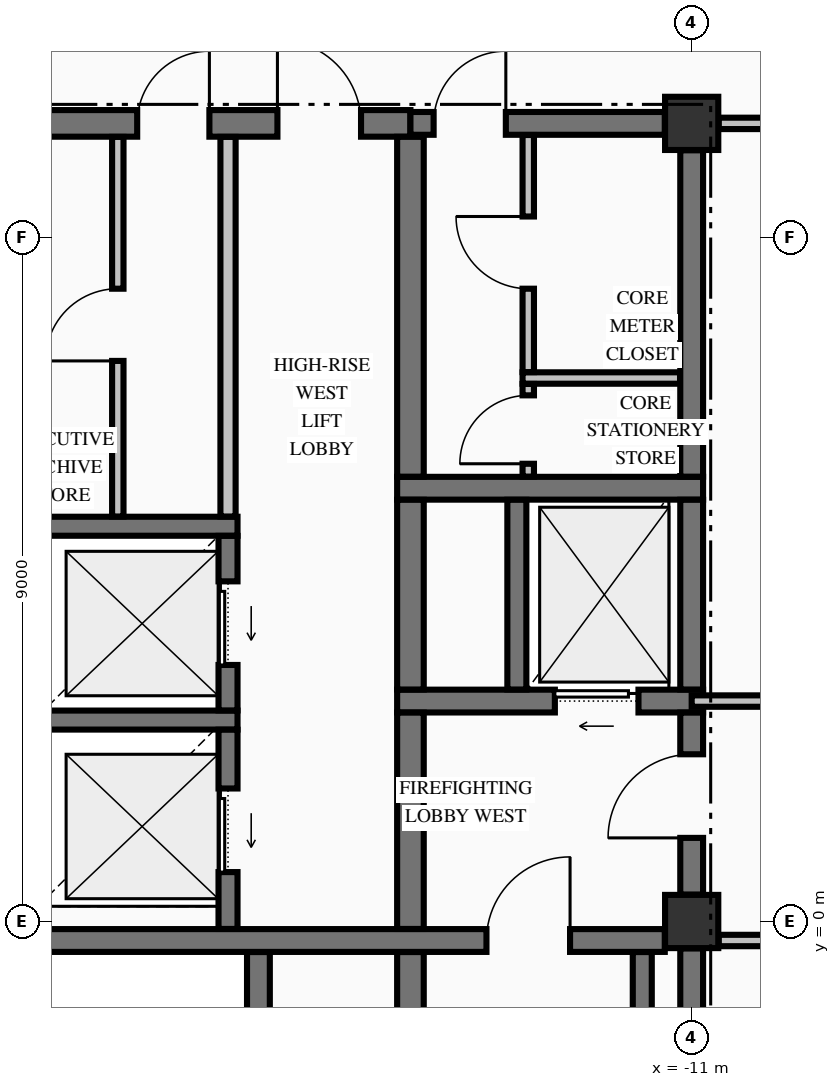
"""IFC4 building model, lengths in metres.
Left out: names, types, materials, properties, quantities, classifications, styles, units other than length and angle.
Written with IfcOpenShell. Run it as: python <this file> out.ifc"""

import sys

from ifc_helpers import new_model, si_unit, direction, frame, frame_2d, origin, origin_2d, place, context, subcontext, project, spatial, rectangle, extrude, element, fill, save


model = new_model("IFC4")
c1 = context("Model", 3, precision=1e-05, world=origin(), true_north=direction((0.0, 1.0)))
c2 = subcontext(c1, "Body", "Model", "MODEL_VIEW")
j1 = project(units=[si_unit("LENGTHUNIT", "METRE"), si_unit("PLANEANGLEUNIT", "RADIAN")], contexts=[c1])
p1 = place(None, origin())
s1 = spatial("IfcSite", under=j1, at=p1, CompositionType="ELEMENT")
p2 = place(p1, origin())
s2 = spatial("IfcBuilding", under=s1, at=p2, CompositionType="ELEMENT")
p3 = place(p2, frame((0.0, 0.0, 246.2)))
s3 = spatial("IfcBuildingStorey", under=s2, at=p3, CompositionType="ELEMENT", Elevation=246.2)
for number, where, z_axis, x_axis in (
    (1, (-11.0, 0.0, -0.25), (0.0, 0.0, 1.0), (1.0, 0.0, 0.0)),
    (2, (-11.0, 10.5, -0.25), (0.0, 0.0, 1.0), (1.0, 0.0, 0.0)),
):
    element("IfcColumn", number, at=place(p3, frame(where, z_axis=z_axis, x_axis=x_axis)), inside=s3, PredefinedType="COLUMN", context=c2, shape_type="SweptSolid", body=[
        extrude(rectangle(XDim=0.7, YDim=0.7, at=origin_2d()), origin(), (0.0, 0.0, 1.0), 3.055),
    ])
p4 = place(p3, frame((-20.571, -0.25, 0.0), z_axis=(0.0, 0.0, 1.0), x_axis=(1.0, 0.0, 0.0)))
e3 = element("IfcWall", 3, at=p4, inside=s3, PredefinedType="SHEAR", context=c2, shape_type="SweptSolid", body=[
    extrude(rectangle(XDim=9.217, YDim=0.3, at=frame_2d((4.608, 0.0))), origin(), (0.0, 0.0, 1.0), 2.805),
])
p5 = place(p4, frame((6.871, 0.0, 0.0)))
e4 = element("IfcOpeningElement", 4, at=p5, cuts=e3, PredefinedType="OPENING", context=c2, shape_type="SweptSolid", body=[
    extrude(rectangle(XDim=1.1, YDim=2.15, at=frame_2d((0.55, 1.075))), frame((0.0, 0.16, 0.0), z_axis=(0.0, -1.0, 0.0), x_axis=(1.0, 0.0, 0.0)), (0.0, 0.0, 1.0), 0.32),
])
p6 = place(p3, frame((-20.175, 2.65, 0.0), z_axis=(0.0, 0.0, 1.0), x_axis=(1.0, 0.0, 0.0)))
e5 = element("IfcWall", 5, at=p6, inside=s3, PredefinedType="SOLIDWALL", context=c2, shape_type="SweptSolid", body=[
    extrude(rectangle(XDim=3.2, YDim=0.25, at=frame_2d((1.6, 0.0))), origin(), (0.0, 0.0, 1.0), 2.805),
])
p7 = place(p3, frame((-14.875, 2.9, 0.0), z_axis=(0.0, 0.0, 1.0), x_axis=(1.0, 0.0, 0.0)))
e6 = element("IfcWall", 6, at=p7, inside=s3, PredefinedType="SHEAR", context=c2, shape_type="SweptSolid", body=[
    extrude(rectangle(XDim=4.025, YDim=0.3, at=frame_2d((2.012, 0.0))), origin(), (0.0, 0.0, 1.0), 2.805),
])
p8 = place(p7, frame((2.075, 0.0, 0.0)))
e7 = element("IfcOpeningElement", 7, at=p8, cuts=e6, PredefinedType="OPENING", context=c2, shape_type="SweptSolid", body=[
    extrude(rectangle(XDim=1.1, YDim=2.2, at=frame_2d((0.55, 1.1))), frame((0.0, 0.16, 0.0), z_axis=(0.0, -1.0, 0.0), x_axis=(1.0, 0.0, 0.0)), (0.0, 0.0, 1.0), 0.32),
])
p9 = place(p3, frame((-20.175, 5.2, 0.0), z_axis=(0.0, 0.0, 1.0), x_axis=(1.0, 0.0, 0.0)))
e8 = element("IfcWall", 8, at=p9, inside=s3, PredefinedType="SOLIDWALL", context=c2, shape_type="SweptSolid", body=[
    extrude(rectangle(XDim=3.2, YDim=0.25, at=frame_2d((1.6, 0.0))), origin(), (0.0, 0.0, 1.0), 2.805),
])
p10 = place(p3, frame((-14.875, 5.7, 0.0), z_axis=(0.0, 0.0, 1.0), x_axis=(1.0, 0.0, 0.0)))
e9 = element("IfcWall", 9, at=p10, inside=s3, PredefinedType="SHEAR", context=c2, shape_type="SweptSolid", body=[
    extrude(rectangle(XDim=4.025, YDim=0.3, at=frame_2d((2.012, 0.0))), origin(), (0.0, 0.0, 1.0), 2.805),
])
p11 = place(p3, frame((-19.646, 10.5, 0.0), z_axis=(0.0, 0.0, 1.0), x_axis=(1.0, 0.0, 0.0)))
e10 = element("IfcWall", 10, at=p11, inside=s3, PredefinedType="SHEAR", context=c2, shape_type="SweptSolid", body=[
    extrude(rectangle(XDim=4.946, YDim=0.35, at=frame_2d((2.473, 0.0))), origin(), (0.0, 0.0, 1.0), 2.805),
])
p12 = place(p11, frame((3.196, 0.0, 0.0)))
e11 = element("IfcOpeningElement", 11, at=p12, cuts=e10, PredefinedType="OPENING", context=c2, shape_type="SweptSolid", body=[
    extrude(rectangle(XDim=1.1, YDim=2.15, at=frame_2d((0.55, 1.075))), frame((0.0, 0.185, 0.0), z_axis=(0.0, -1.0, 0.0), x_axis=(1.0, 0.0, 0.0)), (0.0, 0.0, 1.0), 0.37),
])
p13 = place(p11, frame((1.351, 0.0, 0.0)))
e12 = element("IfcOpeningElement", 12, at=p13, cuts=e10, PredefinedType="OPENING", context=c2, shape_type="SweptSolid", body=[
    extrude(rectangle(XDim=0.95, YDim=2.15, at=frame_2d((0.475, 1.075))), frame((0.0, 0.185, 0.0), z_axis=(0.0, -1.0, 0.0), x_axis=(1.0, 0.0, 0.0)), (0.0, 0.0, 1.0), 0.37),
])
p14 = place(p3, frame((-14.7, 10.5, 0.0), z_axis=(0.0, 0.0, 1.0), x_axis=(1.0, 0.0, 0.0)))
e13 = element("IfcWall", 13, at=p14, inside=s3, PredefinedType="SHEAR", context=c2, shape_type="SweptSolid", body=[
    extrude(rectangle(XDim=3.346, YDim=0.3, at=frame_2d((1.673, 0.0))), origin(), (0.0, 0.0, 1.0), 2.805),
])
p15 = place(p14, frame((0.305, 0.0, 0.0)))
e14 = element("IfcOpeningElement", 14, at=p15, cuts=e13, PredefinedType="OPENING", context=c2, shape_type="SweptSolid", body=[
    extrude(rectangle(XDim=0.95, YDim=2.15, at=frame_2d((0.475, 1.075))), frame((0.0, 0.16, 0.0), z_axis=(0.0, -1.0, 0.0), x_axis=(1.0, 0.0, 0.0)), (0.0, 0.0, 1.0), 0.32),
])
p16 = place(p3, frame((-10.644, -0.25, 0.0), z_axis=(0.0, 0.0, 1.0), x_axis=(1.0, 0.0, 0.0)))
e15 = element("IfcWall", 15, at=p16, inside=s3, PredefinedType="PARTITIONING", context=c2, shape_type="SweptSolid", body=[
    extrude(rectangle(XDim=21.288, YDim=0.15, at=frame_2d((10.644, 0.0))), origin(), (0.0, 0.0, 1.0), 2.805),
])
p17 = place(p16, frame((7.344, 0.0, 0.0)))
e16 = element("IfcOpeningElement", 16, at=p17, cuts=e15, PredefinedType="OPENING", context=c2, shape_type="SweptSolid", body=[
    extrude(rectangle(XDim=1.1, YDim=2.15, at=frame_2d((0.55, 1.075))), frame((0.0, 0.085, 0.0), z_axis=(0.0, -1.0, 0.0), x_axis=(1.0, 0.0, 0.0)), (0.0, 0.0, 1.0), 0.17),
])
p18 = place(p16, frame((2.699, 0.0, 0.0)))
e17 = element("IfcOpeningElement", 17, at=p18, cuts=e15, PredefinedType="OPENING", context=c2, shape_type="SweptSolid", body=[
    extrude(rectangle(XDim=1.05, YDim=2.15, at=frame_2d((0.525, 1.075))), frame((0.0, 0.085, 0.0), z_axis=(0.0, -1.0, 0.0), x_axis=(1.0, 0.0, 0.0)), (0.0, 0.0, 1.0), 0.17),
])
p19 = place(p16, frame((14.839, 0.0, 0.0)))
e18 = element("IfcOpeningElement", 18, at=p19, cuts=e15, PredefinedType="OPENING", context=c2, shape_type="SweptSolid", body=[
    extrude(rectangle(XDim=0.95, YDim=2.15, at=frame_2d((0.475, 1.075))), frame((0.0, 0.085, 0.0), z_axis=(0.0, -1.0, 0.0), x_axis=(1.0, 0.0, 0.0)), (0.0, 0.0, 1.0), 0.17),
])
p20 = place(p3, frame((-11.0, 2.9, 0.0), z_axis=(0.0, 0.0, 1.0), x_axis=(1.0, 0.0, 0.0)))
e19 = element("IfcWall", 19, at=p20, inside=s3, PredefinedType="PARTITIONING", context=c2, shape_type="SweptSolid", body=[
    extrude(rectangle(XDim=22.0, YDim=0.15, at=frame_2d((11.0, 0.0))), origin(), (0.0, 0.0, 1.0), 2.805),
])
p21 = place(p20, frame((7.7, 0.0, 0.0)))
e20 = element("IfcOpeningElement", 20, at=p21, cuts=e19, PredefinedType="OPENING", context=c2, shape_type="SweptSolid", body=[
    extrude(rectangle(XDim=1.1, YDim=2.15, at=frame_2d((0.55, 1.075))), frame((0.0, 0.085, 0.0), z_axis=(0.0, -1.0, 0.0), x_axis=(1.0, 0.0, 0.0)), (0.0, 0.0, 1.0), 0.17),
])
p22 = place(p20, frame((3.055, 0.0, 0.0)))
e21 = element("IfcOpeningElement", 21, at=p22, cuts=e19, PredefinedType="OPENING", context=c2, shape_type="SweptSolid", body=[
    extrude(rectangle(XDim=1.05, YDim=2.15, at=frame_2d((0.525, 1.075))), frame((0.0, 0.085, 0.0), z_axis=(0.0, -1.0, 0.0), x_axis=(1.0, 0.0, 0.0)), (0.0, 0.0, 1.0), 0.17),
])
p23 = place(p20, frame((11.475, 0.0, 0.0)))
e22 = element("IfcOpeningElement", 22, at=p23, cuts=e19, PredefinedType="OPENING", context=c2, shape_type="SweptSolid", body=[
    extrude(rectangle(XDim=0.95, YDim=2.15, at=frame_2d((0.475, 1.075))), frame((0.0, 0.085, 0.0), z_axis=(0.0, -1.0, 0.0), x_axis=(1.0, 0.0, 0.0)), (0.0, 0.0, 1.0), 0.17),
])
p24 = place(p20, frame((17.795, 0.0, 0.0)))
e23 = element("IfcOpeningElement", 23, at=p24, cuts=e19, PredefinedType="OPENING", context=c2, shape_type="SweptSolid", body=[
    extrude(rectangle(XDim=0.95, YDim=2.15, at=frame_2d((0.475, 1.075))), frame((0.0, 0.085, 0.0), z_axis=(0.0, -1.0, 0.0), x_axis=(1.0, 0.0, 0.0)), (0.0, 0.0, 1.0), 0.17),
])
p25 = place(p3, frame((-13.225, 7.15, 0.0), z_axis=(0.0, 0.0, 1.0), x_axis=(1.0, 0.0, 0.0)))
e24 = element("IfcWall", 24, at=p25, inside=s3, PredefinedType="PARTITIONING", context=c2, shape_type="SweptSolid", body=[
    extrude(rectangle(XDim=2.072, YDim=0.15, at=frame_2d((1.036, 0.0))), origin(), (0.0, 0.0, 1.0), 2.805),
])
p26 = place(p3, frame((-10.644, 10.5, 0.0), z_axis=(0.0, 0.0, 1.0), x_axis=(1.0, 0.0, 0.0)))
e25 = element("IfcWall", 25, at=p26, inside=s3, PredefinedType="PARTITIONING", context=c2, shape_type="SweptSolid", body=[
    extrude(rectangle(XDim=21.288, YDim=0.15, at=frame_2d((10.644, 0.0))), origin(), (0.0, 0.0, 1.0), 2.805),
])
p27 = place(p26, frame((7.344, 0.0, 0.0)))
e26 = element("IfcOpeningElement", 26, at=p27, cuts=e25, PredefinedType="OPENING", context=c2, shape_type="SweptSolid", body=[
    extrude(rectangle(XDim=1.1, YDim=2.15, at=frame_2d((0.55, 1.075))), frame((0.0, 0.085, 0.0), z_axis=(0.0, -1.0, 0.0), x_axis=(1.0, 0.0, 0.0)), (0.0, 0.0, 1.0), 0.17),
])
p28 = place(p3, frame((-17.1, -0.098, 0.0), z_axis=(0.0, 0.0, 1.0), x_axis=(0.0, 1.0, 0.0)))
e27 = element("IfcWall", 27, at=p28, inside=s3, PredefinedType="SOLIDWALL", context=c2, shape_type="SweptSolid", body=[
    extrude(rectangle(XDim=2.621, YDim=0.25, at=frame_2d((1.311, 0.0))), origin(), (0.0, 0.0, 1.0), 2.805),
])
p29 = place(p28, frame((0.748, 0.0, 0.0)))
e28 = element("IfcOpeningElement", 28, at=p29, cuts=e27, PredefinedType="OPENING", context=c2, shape_type="SweptSolid", body=[
    extrude(rectangle(XDim=1.1, YDim=2.2, at=frame_2d((0.55, 1.1))), frame((0.0, 0.135, 0.0), z_axis=(0.0, -1.0, 0.0), x_axis=(1.0, 0.0, 0.0)), (0.0, 0.0, 1.0), 0.27),
])
p30 = place(p3, frame((-17.1, 2.777, 0.0), z_axis=(0.0, 0.0, 1.0), x_axis=(0.0, 1.0, 0.0)))
e29 = element("IfcWall", 29, at=p30, inside=s3, PredefinedType="SOLIDWALL", context=c2, shape_type="SweptSolid", body=[
    extrude(rectangle(XDim=2.296, YDim=0.25, at=frame_2d((1.148, 0.0))), origin(), (0.0, 0.0, 1.0), 2.805),
])
p31 = place(p30, frame((0.598, 0.0, 0.0)))
e30 = element("IfcOpeningElement", 30, at=p31, cuts=e29, PredefinedType="OPENING", context=c2, shape_type="SweptSolid", body=[
    extrude(rectangle(XDim=1.1, YDim=2.2, at=frame_2d((0.55, 1.1))), frame((0.0, 0.135, 0.0), z_axis=(0.0, -1.0, 0.0), x_axis=(1.0, 0.0, 0.0)), (0.0, 0.0, 1.0), 0.27),
])
p32 = place(p3, frame((-16.7, -9.773, 0.0), z_axis=(0.0, 0.0, 1.0), x_axis=(0.0, 1.0, 0.0)))
e31 = element("IfcWall", 31, at=p32, inside=s3, PredefinedType="SHEAR", context=c2, shape_type="SweptSolid", body=[
    extrude(rectangle(XDim=9.371, YDim=0.3, at=frame_2d((4.686, 0.0))), origin(), (0.0, 0.0, 1.0), 2.805),
])
p33 = place(p3, frame((-14.7, -9.773, 0.0), z_axis=(0.0, 0.0, 1.0), x_axis=(0.0, 1.0, 0.0)))
e32 = element("IfcWall", 32, at=p33, inside=s3, PredefinedType="SHEAR", context=c2, shape_type="SweptSolid", body=[
    extrude(rectangle(XDim=9.371, YDim=0.35, at=frame_2d((4.686, 0.0))), origin(), (0.0, 0.0, 1.0), 2.805),
])
p34 = place(p3, frame((-14.7, -0.098, 0.0), z_axis=(0.0, 0.0, 1.0), x_axis=(0.0, 1.0, 0.0)))
e33 = element("IfcWall", 33, at=p34, inside=s3, PredefinedType="SHEAR", context=c2, shape_type="SweptSolid", body=[
    extrude(rectangle(XDim=2.846, YDim=0.35, at=frame_2d((1.423, 0.0))), origin(), (0.0, 0.0, 1.0), 2.805),
])
p35 = place(p3, frame((-14.7, 3.052, 0.0), z_axis=(0.0, 0.0, 1.0), x_axis=(0.0, 1.0, 0.0)))
e34 = element("IfcWall", 34, at=p35, inside=s3, PredefinedType="SHEAR", context=c2, shape_type="SweptSolid", body=[
    extrude(rectangle(XDim=2.496, YDim=0.35, at=frame_2d((1.248, 0.0))), origin(), (0.0, 0.0, 1.0), 2.805),
])
p36 = place(p3, frame((-14.7, 5.852, 0.0), z_axis=(0.0, 0.0, 1.0), x_axis=(0.0, 1.0, 0.0)))
e35 = element("IfcWall", 35, at=p36, inside=s3, PredefinedType="SHEAR", context=c2, shape_type="SweptSolid", body=[
    extrude(rectangle(XDim=4.471, YDim=0.35, at=frame_2d((2.235, 0.0))), origin(), (0.0, 0.0, 1.0), 2.805),
])
p37 = place(p3, frame((-13.3, 3.052, 0.0), z_axis=(0.0, 0.0, 1.0), x_axis=(0.0, 1.0, 0.0)))
e36 = element("IfcWall", 36, at=p37, inside=s3, PredefinedType="SOLIDWALL", context=c2, shape_type="SweptSolid", body=[
    extrude(rectangle(XDim=2.496, YDim=0.25, at=frame_2d((1.248, 0.0))), origin(), (0.0, 0.0, 1.0), 2.805),
])
p38 = place(p3, frame((-11.65, -9.798, 0.0), z_axis=(0.0, 0.0, 1.0), x_axis=(0.0, 1.0, 0.0)))
e37 = element("IfcWall", 37, at=p38, inside=s3, PredefinedType="SOLIDWALL", context=c2, shape_type="SweptSolid", body=[
    extrude(rectangle(XDim=9.396, YDim=0.25, at=frame_2d((4.698, 0.0))), origin(), (0.0, 0.0, 1.0), 2.805),
])
p39 = place(p3, frame((-11.0, -9.596, 0.0), z_axis=(0.0, 0.0, 1.0), x_axis=(0.0, 1.0, 0.0)))
e38 = element("IfcWall", 38, at=p39, inside=s3, PredefinedType="SHEAR", context=c2, shape_type="SweptSolid", body=[
    extrude(rectangle(XDim=9.242, YDim=0.3, at=frame_2d((4.621, 0.0))), origin(), (0.0, 0.0, 1.0), 2.805),
])
p40 = place(p3, frame((-11.0, 0.354, 0.0), z_axis=(0.0, 0.0, 1.0), x_axis=(0.0, 1.0, 0.0)))
e39 = element("IfcWall", 39, at=p40, inside=s3, PredefinedType="SHEAR", context=c2, shape_type="SweptSolid", body=[
    extrude(rectangle(XDim=2.394, YDim=0.3, at=frame_2d((1.197, 0.0))), origin(), (0.0, 0.0, 1.0), 2.805),
])
p41 = place(p40, frame((0.746, 0.0, 0.0)))
e40 = element("IfcOpeningElement", 40, at=p41, cuts=e39, PredefinedType="OPENING", context=c2, shape_type="SweptSolid", body=[
    extrude(rectangle(XDim=1.1, YDim=2.15, at=frame_2d((0.55, 1.075))), frame((0.0, 0.16, 0.0), z_axis=(0.0, -1.0, 0.0), x_axis=(1.0, 0.0, 0.0)), (0.0, 0.0, 1.0), 0.32),
])
p42 = place(p3, frame((-11.0, 3.052, 0.0), z_axis=(0.0, 0.0, 1.0), x_axis=(0.0, 1.0, 0.0)))
e41 = element("IfcWall", 41, at=p42, inside=s3, PredefinedType="SHEAR", context=c2, shape_type="SweptSolid", body=[
    extrude(rectangle(XDim=2.496, YDim=0.3, at=frame_2d((1.248, 0.0))), origin(), (0.0, 0.0, 1.0), 2.805),
])
p43 = place(p3, frame((-11.0, 5.852, 0.0), z_axis=(0.0, 0.0, 1.0), x_axis=(0.0, 1.0, 0.0)))
e42 = element("IfcWall", 42, at=p43, inside=s3, PredefinedType="SHEAR", context=c2, shape_type="SweptSolid", body=[
    extrude(rectangle(XDim=4.294, YDim=0.3, at=frame_2d((2.147, 0.0))), origin(), (0.0, 0.0, 1.0), 2.805),
])
p44 = place(p3, frame((-18.55, 5.328, 0.0), z_axis=(0.0, 0.0, 1.0), x_axis=(0.0, 1.0, 0.0)))
e43 = element("IfcWall", 43, at=p44, inside=s3, PredefinedType="PARTITIONING", context=c2, shape_type="SweptSolid", body=[
    extrude(rectangle(XDim=4.994, YDim=0.15, at=frame_2d((2.497, 0.0))), origin(), (0.0, 0.0, 1.0), 2.805),
])
p45 = place(p44, frame((2.047, 0.0, 0.0)))
e44 = element("IfcOpeningElement", 44, at=p45, cuts=e43, PredefinedType="OPENING", context=c2, shape_type="SweptSolid", body=[
    extrude(rectangle(XDim=0.95, YDim=2.15, at=frame_2d((0.475, 1.075))), frame((0.0, 0.085, 0.0), z_axis=(0.0, -1.0, 0.0), x_axis=(1.0, 0.0, 0.0)), (0.0, 0.0, 1.0), 0.17),
])
p46 = place(p3, frame((-17.1, 5.328, 0.0), z_axis=(0.0, 0.0, 1.0), x_axis=(0.0, 1.0, 0.0)))
e45 = element("IfcWall", 45, at=p46, inside=s3, PredefinedType="PARTITIONING", context=c2, shape_type="SweptSolid", body=[
    extrude(rectangle(XDim=4.994, YDim=0.2, at=frame_2d((2.497, 0.0))), origin(), (0.0, 0.0, 1.0), 2.805),
])
p47 = place(p3, frame((-13.15, 5.853, 0.0), z_axis=(0.0, 0.0, 1.0), x_axis=(0.0, 1.0, 0.0)))
e46 = element("IfcWall", 46, at=p47, inside=s3, PredefinedType="PARTITIONING", context=c2, shape_type="SweptSolid", body=[
    extrude(rectangle(XDim=1.219, YDim=0.15, at=frame_2d((0.609, 0.0))), origin(), (0.0, 0.0, 1.0), 2.805),
])
p48 = place(p47, frame((0.169, 0.0, 0.0)))
e47 = element("IfcOpeningElement", 47, at=p48, cuts=e46, PredefinedType="OPENING", context=c2, shape_type="SweptSolid", body=[
    extrude(rectangle(XDim=0.9, YDim=2.15, at=frame_2d((0.45, 1.075))), frame((0.0, 0.085, 0.0), z_axis=(0.0, -1.0, 0.0), x_axis=(1.0, 0.0, 0.0)), (0.0, 0.0, 1.0), 0.17),
])
p49 = place(p3, frame((-13.15, 7.228, 0.0), z_axis=(0.0, 0.0, 1.0), x_axis=(0.0, 1.0, 0.0)))
e48 = element("IfcWall", 48, at=p49, inside=s3, PredefinedType="PARTITIONING", context=c2, shape_type="SweptSolid", body=[
    extrude(rectangle(XDim=3.119, YDim=0.15, at=frame_2d((1.56, 0.0))), origin(), (0.0, 0.0, 1.0), 2.805),
])
p50 = place(p49, frame((1.097, 0.0, 0.0)))
e49 = element("IfcOpeningElement", 49, at=p50, cuts=e48, PredefinedType="OPENING", context=c2, shape_type="SweptSolid", body=[
    extrude(rectangle(XDim=0.95, YDim=2.15, at=frame_2d((0.475, 1.075))), frame((0.0, 0.085, 0.0), z_axis=(0.0, -1.0, 0.0), x_axis=(1.0, 0.0, 0.0)), (0.0, 0.0, 1.0), 0.17),
])
p51 = place(p5, origin())
e50 = element("IfcDoor", 50, at=p51, inside=s3, OperationType="SINGLE_SWING_RIGHT", PredefinedType="DOOR", context=c2, shape_type="SweptSolid", body=[
    extrude(rectangle(XDim=1.1, YDim=2.15, at=frame_2d((0.55, 1.075))), frame((0.0, 0.025, 0.0), z_axis=(0.0, -1.0, 0.0), x_axis=(1.0, 0.0, 0.0)), (0.0, 0.0, 1.0), 0.05),
])
fill(e4, e50)
p52 = place(p41, origin())
e51 = element("IfcDoor", 51, at=p52, inside=s3, OperationType="SINGLE_SWING_LEFT", PredefinedType="DOOR", context=c2, shape_type="SweptSolid", body=[
    extrude(rectangle(XDim=1.1, YDim=2.15, at=frame_2d((0.55, 1.075))), frame((0.0, 0.025, 0.0), z_axis=(0.0, -1.0, 0.0), x_axis=(1.0, 0.0, 0.0)), (0.0, 0.0, 1.0), 0.05),
])
fill(e40, e51)
p53 = place(p8, origin())
e52 = element("IfcDoor", 52, at=p53, inside=s3, OperationType="SLIDING_TO_LEFT", PredefinedType="DOOR", context=c2, shape_type="SweptSolid", body=[
    extrude(rectangle(XDim=1.1, YDim=2.2, at=frame_2d((0.55, 1.1))), frame((0.0, 0.025, 0.0), z_axis=(0.0, -1.0, 0.0), x_axis=(1.0, 0.0, 0.0)), (0.0, 0.0, 1.0), 0.05),
])
fill(e7, e52)
p54 = place(p15, origin())
e53 = element("IfcDoor", 53, at=p54, inside=s3, OperationType="SINGLE_SWING_RIGHT", PredefinedType="DOOR", context=c2, shape_type="SweptSolid", body=[
    extrude(rectangle(XDim=0.95, YDim=2.15, at=frame_2d((0.475, 1.075))), frame((0.0, 0.025, 0.0), z_axis=(0.0, -1.0, 0.0), x_axis=(1.0, 0.0, 0.0)), (0.0, 0.0, 1.0), 0.05),
])
fill(e14, e53)
p55 = place(p48, origin())
e54 = element("IfcDoor", 54, at=p55, inside=s3, OperationType="SINGLE_SWING_LEFT", PredefinedType="DOOR", context=c2, shape_type="SweptSolid", body=[
    extrude(rectangle(XDim=0.9, YDim=2.15, at=frame_2d((0.45, 1.075))), frame((0.0, 0.025, 0.0), z_axis=(0.0, -1.0, 0.0), x_axis=(1.0, 0.0, 0.0)), (0.0, 0.0, 1.0), 0.05),
])
fill(e47, e54)
p56 = place(p50, origin())
e55 = element("IfcDoor", 55, at=p56, inside=s3, OperationType="SINGLE_SWING_RIGHT", PredefinedType="DOOR", context=c2, shape_type="SweptSolid", body=[
    extrude(rectangle(XDim=0.95, YDim=2.15, at=frame_2d((0.475, 1.075))), frame((0.0, 0.025, 0.0), z_axis=(0.0, -1.0, 0.0), x_axis=(1.0, 0.0, 0.0)), (0.0, 0.0, 1.0), 0.05),
])
fill(e49, e55)
p57 = place(p29, origin())
e56 = element("IfcDoor", 56, at=p57, inside=s3, OperationType="SLIDING_TO_LEFT", PredefinedType="DOOR", context=c2, shape_type="SweptSolid", body=[
    extrude(rectangle(XDim=1.1, YDim=2.2, at=frame_2d((0.55, 1.1))), frame((0.0, 0.025, 0.0), z_axis=(0.0, -1.0, 0.0), x_axis=(1.0, 0.0, 0.0)), (0.0, 0.0, 1.0), 0.05),
])
fill(e28, e56)
p58 = place(p31, origin())
e57 = element("IfcDoor", 57, at=p58, inside=s3, OperationType="SLIDING_TO_LEFT", PredefinedType="DOOR", context=c2, shape_type="SweptSolid", body=[
    extrude(rectangle(XDim=1.1, YDim=2.2, at=frame_2d((0.55, 1.1))), frame((0.0, 0.025, 0.0), z_axis=(0.0, -1.0, 0.0), x_axis=(1.0, 0.0, 0.0)), (0.0, 0.0, 1.0), 0.05),
])
fill(e30, e57)
p59 = place(p12, origin())
e58 = element("IfcDoor", 58, at=p59, inside=s3, OperationType="SINGLE_SWING_LEFT", PredefinedType="DOOR", context=c2, shape_type="SweptSolid", body=[
    extrude(rectangle(XDim=1.1, YDim=2.15, at=frame_2d((0.55, 1.075))), frame((0.0, 0.025, 0.0), z_axis=(0.0, -1.0, 0.0), x_axis=(1.0, 0.0, 0.0)), (0.0, 0.0, 1.0), 0.05),
])
fill(e11, e58)
p60 = place(p13, origin())
e59 = element("IfcDoor", 59, at=p60, inside=s3, OperationType="SINGLE_SWING_RIGHT", PredefinedType="DOOR", context=c2, shape_type="SweptSolid", body=[
    extrude(rectangle(XDim=0.95, YDim=2.15, at=frame_2d((0.475, 1.075))), frame((0.0, 0.025, 0.0), z_axis=(0.0, -1.0, 0.0), x_axis=(1.0, 0.0, 0.0)), (0.0, 0.0, 1.0), 0.05),
])
fill(e12, e59)
p61 = place(p45, origin())
e60 = element("IfcDoor", 60, at=p61, inside=s3, OperationType="SINGLE_SWING_LEFT", PredefinedType="DOOR", context=c2, shape_type="SweptSolid", body=[
    extrude(rectangle(XDim=0.95, YDim=2.15, at=frame_2d((0.475, 1.075))), frame((0.0, 0.025, 0.0), z_axis=(0.0, -1.0, 0.0), x_axis=(1.0, 0.0, 0.0)), (0.0, 0.0, 1.0), 0.05),
])
fill(e44, e60)
save(model, sys.argv[1])
